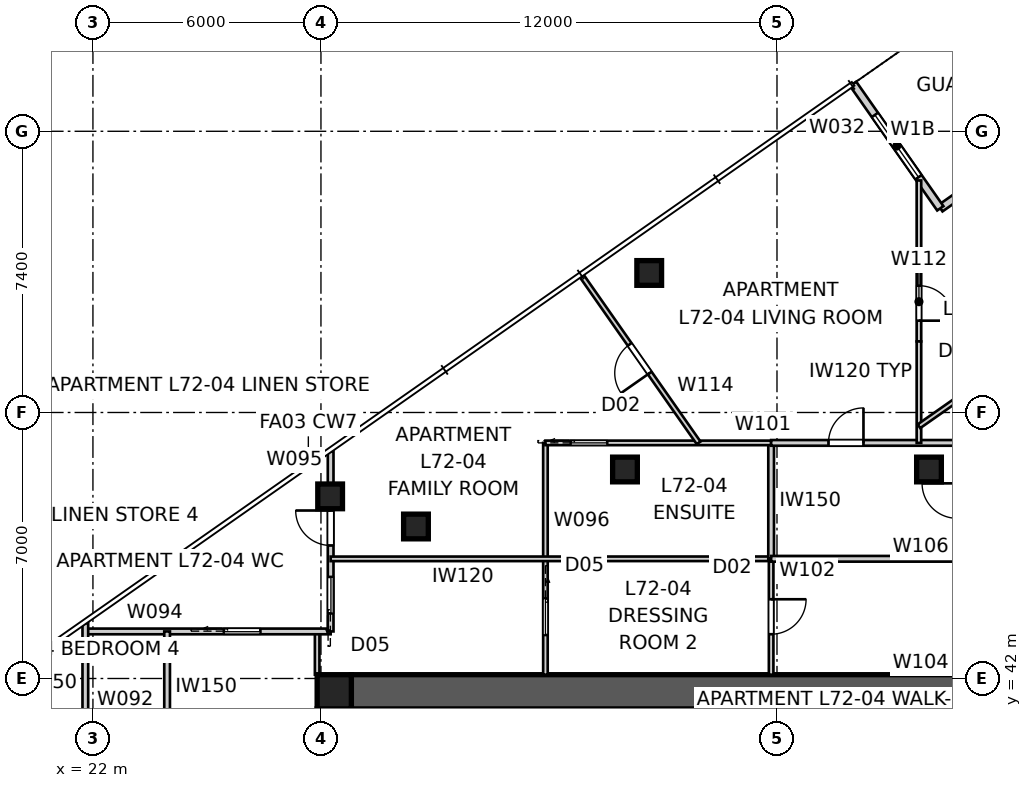
"""IFC4 building model, lengths in metres.
Left out: names, types, materials, properties, quantities, classifications, styles, units other than length and angle.
Written with IfcOpenShell. Run it as: python <this file> out.ifc"""

import sys

from ifc_helpers import new_model, si_unit, direction, frame, frame_2d, origin, origin_2d, place, context, subcontext, project, spatial, polyline, rectangle, outline, extrude, element, fill, save


model = new_model("IFC4")
c1 = context("Model", 3, precision=1e-05, world=origin(), true_north=direction((0.0, 1.0)))
c2 = subcontext(c1, "Body", "Model", "MODEL_VIEW")
j1 = project(units=[si_unit("LENGTHUNIT", "METRE"), si_unit("PLANEANGLEUNIT", "RADIAN")], contexts=[c1])
p1 = place(None, origin())
s1 = spatial("IfcSite", under=j1, at=p1, CompositionType="ELEMENT")
p2 = place(p1, origin())
s2 = spatial("IfcBuilding", under=s1, at=p2, CompositionType="ELEMENT")
p3 = place(p2, frame((0.0, 0.0, 260.8)))
s3 = spatial("IfcBuildingStorey", under=s2, at=p3, CompositionType="ELEMENT", Elevation=260.8)
p4 = place(p3, frame((28.8, 41.65, 0.0), z_axis=(0.0, 0.0, 1.0), x_axis=(1.0, 0.0, 0.0)))
e1 = element("IfcWall", 1, at=p4, inside=s3, PredefinedType="SHEAR", context=c2, shape_type="SweptSolid", body=[
    extrude(outline(polyline([(0.0, -0.45), (22.4, -0.45), (22.4, -0.025), (22.85, -0.025), (22.85, 0.025), (22.4, 0.025), (22.4, 0.45), (0.0, 0.45), (0.0, 0.025), (-0.45, 0.025), (-0.45, -0.025), (0.0, -0.025), (0.0, -0.45)])), origin(), (0.0, 0.0, 1.0), 3.4),
])
p5 = place(p3, frame((28.35, 41.2, 0.0), z_axis=(0.0, 0.0, 1.0), x_axis=(0.0, -1.0, 0.0)))
e2 = element("IfcWall", 2, at=p5, inside=s3, PredefinedType="SHEAR", context=c2, shape_type="SweptSolid", body=[
    extrude(outline(polyline([(0.0, -0.45), (22.4, -0.45), (22.4, -0.025), (22.85, -0.025), (22.85, 0.025), (22.4, 0.025), (22.4, 0.45), (0.0, 0.45), (0.0, 0.025), (-0.45, 0.025), (-0.45, -0.025), (0.0, -0.025), (0.0, -0.45)])), origin(), (0.0, 0.0, 1.0), 3.4),
])
p6 = place(p5, frame((11.14, 0.0, 0.0)))
e3 = element("IfcOpeningElement", 3, at=p6, cuts=e2, PredefinedType="OPENING", context=c2, shape_type="SweptSolid", body=[
    extrude(rectangle(XDim=1.02, YDim=2.4, at=frame_2d((0.51, 1.2))), frame((0.0, 0.46, 0.0), z_axis=(0.0, -1.0, 0.0), x_axis=(1.0, 0.0, 0.0)), (0.0, 0.0, 1.0), 0.92),
])
p7 = place(p3, frame((28.35, 41.65, 0.0), z_axis=(0.0, 0.0, 1.0), x_axis=(1.0, 0.0, 0.0)))
e4 = element("IfcColumn", 4, at=p7, inside=s3, PredefinedType="COLUMN", context=c2, shape_type="SweptSolid", body=[
    extrude(rectangle(XDim=0.9, YDim=0.9, at=origin_2d()), origin(), (0.0, 0.0, 1.0), 3.4),
])
for number, where, z_axis, x_axis in (
    (5, (36.638, 52.672, 0.0), (0.0, 0.0, 1.0), (1.0, 0.0, 0.0)),
    (6, (28.242, 46.793, 0.0), (0.0, 0.0, 1.0), (1.0, 0.0, 0.0)),
    (7, (44.0, 47.5, 0.0), (0.0, 0.0, 1.0), (1.0, 0.0, 0.0)),
    (8, (36.0, 47.5, 0.0), (0.0, 0.0, 1.0), (1.0, 0.0, 0.0)),
    (9, (30.5, 46.0, 0.0), (0.0, 0.0, 1.0), (1.0, 0.0, 0.0)),
):
    element("IfcColumn", number, at=place(p3, frame(where, z_axis=z_axis, x_axis=x_axis)), inside=s3, PredefinedType="COLUMN", context=c2, shape_type="SweptSolid", body=[
        extrude(rectangle(XDim=0.65, YDim=0.65, at=origin_2d()), origin(), (0.0, 0.0, 1.0), 3.4),
    ])
p8 = place(p3, frame((47.574, 56.667, 0.0), z_axis=(0.0, 0.0, 1.0), x_axis=(-0.819165963305, -0.573556557423, 0.0)))
e10 = element("IfcWall", 10, at=p8, inside=s3, PredefinedType="SOLIDWALL", context=c2, shape_type="SweptSolid", body=[
    extrude(rectangle(XDim=4.0, YDim=0.2, at=frame_2d((2.0, 0.0))), origin(), (0.0, 0.0, 1.0), 3.25),
])
p9 = place(p8, frame((0.8, 0.0, 0.0)))
e11 = element("IfcOpeningElement", 11, at=p9, cuts=e10, PredefinedType="OPENING", context=c2, shape_type="SweptSolid", body=[
    extrude(rectangle(XDim=2.4, YDim=2.1, at=frame_2d((1.2, 1.05))), frame((0.0, 0.11, 0.0), z_axis=(0.0, -1.0, 0.0), x_axis=(1.0, 0.0, 0.0)), (0.0, 0.0, 1.0), 0.22),
])
p10 = place(p3, frame((44.298, 54.373, 0.0), z_axis=(0.0, 0.0, 1.0), x_axis=(-0.573597512525, 0.819137286189, 0.0)))
e12 = element("IfcWall", 12, at=p10, inside=s3, PredefinedType="SOLIDWALL", context=c2, shape_type="SweptSolid", body=[
    extrude(rectangle(XDim=4.0, YDim=0.2, at=frame_2d((2.0, 0.0))), origin(), (0.0, 0.0, 1.0), 3.25),
])
p11 = place(p10, frame((1.0, 0.0, 0.45)))
e13 = element("IfcOpeningElement", 13, at=p11, cuts=e12, PredefinedType="OPENING", context=c2, shape_type="SweptSolid", body=[
    extrude(rectangle(XDim=2.0, YDim=1.8, at=frame_2d((1.0, 0.9))), frame((0.0, 0.11, 0.0), z_axis=(0.0, -1.0, 0.0), x_axis=(1.0, 0.0, 0.0)), (0.0, 0.0, 1.0), 0.22),
])
p12 = place(p3, frame((27.9, 42.1, 0.0), z_axis=(0.0, 0.0, 1.0), x_axis=(0.0, 1.0, 0.0)))
e14 = element("IfcWall", 14, at=p12, inside=s3, PredefinedType="PARTITIONING", context=c2, shape_type="SweptSolid", body=[
    extrude(rectangle(XDim=1.138, YDim=0.12, at=frame_2d((0.569, 0.0))), origin(), (0.0, 0.0, 1.0), 3.25),
])
p13 = place(p3, frame((21.8, 43.238, 0.0), z_axis=(0.0, 0.0, 1.0), x_axis=(1.0, 0.0, 0.0)))
e15 = element("IfcWall", 15, at=p13, inside=s3, PredefinedType="SOLIDWALL", context=c2, shape_type="SweptSolid", body=[
    extrude(rectangle(XDim=6.455, YDim=0.15, at=frame_2d((3.228, 0.0))), origin(), (0.0, 0.0, 1.0), 3.25),
])
p14 = place(p13, frame((3.646, 0.0, 0.0)))
e16 = element("IfcOpeningElement", 16, at=p14, cuts=e15, PredefinedType="OPENING", context=c2, shape_type="SweptSolid", body=[
    extrude(rectangle(XDim=0.96, YDim=2.1, at=frame_2d((0.48, 1.05))), frame((0.0, 0.085, 0.0), z_axis=(0.0, -1.0, 0.0), x_axis=(1.0, 0.0, 0.0)), (0.0, 0.0, 1.0), 0.17),
])
p15 = place(p3, frame((28.255, 43.238, 0.0), z_axis=(0.0, 0.0, 1.0), x_axis=(0.0, 1.0, 0.0)))
e17 = element("IfcWall", 17, at=p15, inside=s3, PredefinedType="SOLIDWALL", context=c2, shape_type="SweptSolid", body=[
    extrude(rectangle(XDim=4.736, YDim=0.15, at=frame_2d((2.368, 0.0))), origin(), (0.0, 0.0, 1.0), 3.25),
])
p16 = place(p15, frame((2.262, 0.0, 0.0)))
e18 = element("IfcOpeningElement", 18, at=p16, cuts=e17, PredefinedType="OPENING", context=c2, shape_type="SweptSolid", body=[
    extrude(rectangle(XDim=0.92, YDim=2.34, at=frame_2d((0.46, 1.17))), frame((0.0, 0.085, 0.0), z_axis=(0.0, -1.0, 0.0), x_axis=(1.0, 0.0, 0.0)), (0.0, 0.0, 1.0), 0.17),
])
p17 = place(p15, frame((0.475, 0.0, 0.0)))
e19 = element("IfcOpeningElement", 19, at=p17, cuts=e17, PredefinedType="OPENING", context=c2, shape_type="SweptSolid", body=[
    extrude(rectangle(XDim=0.96, YDim=2.1, at=frame_2d((0.48, 1.05))), frame((0.0, 0.085, 0.0), z_axis=(0.0, -1.0, 0.0), x_axis=(1.0, 0.0, 0.0)), (0.0, 0.0, 1.0), 0.17),
])
p18 = place(p3, frame((33.907, 48.2, 0.0), z_axis=(0.0, 0.0, 1.0), x_axis=(0.0, -1.0, 0.0)))
e20 = element("IfcWall", 20, at=p18, inside=s3, PredefinedType="PARTITIONING", context=c2, shape_type="SweptSolid", body=[
    extrude(rectangle(XDim=6.1, YDim=0.12, at=frame_2d((3.05, 0.0))), origin(), (0.0, 0.0, 1.0), 3.25),
])
p19 = place(p18, frame((4.096, 0.0, 0.0)))
e21 = element("IfcOpeningElement", 21, at=p19, cuts=e20, PredefinedType="OPENING", context=c2, shape_type="SweptSolid", body=[
    extrude(rectangle(XDim=0.96, YDim=2.1, at=frame_2d((0.48, 1.05))), frame((0.0, 0.07, 0.0), z_axis=(0.0, -1.0, 0.0), x_axis=(1.0, 0.0, 0.0)), (0.0, 0.0, 1.0), 0.14),
])
p20 = place(p3, frame((28.255, 45.148, 0.0), z_axis=(0.0, 0.0, 1.0), x_axis=(0.99999998913, 0.000147442917, 0.0)))
e22 = element("IfcWall", 22, at=p20, inside=s3, PredefinedType="PARTITIONING", context=c2, shape_type="SweptSolid", body=[
    extrude(rectangle(XDim=11.591, YDim=0.12, at=frame_2d((5.795, 0.0))), origin(), (0.0, 0.0, 1.0), 3.25),
])
p21 = place(p3, frame((23.952, 40.328, 0.0), z_axis=(0.0, 0.0, 1.0), x_axis=(0.0, 1.0, 0.0)))
e23 = element("IfcWall", 23, at=p21, inside=s3, PredefinedType="SOLIDWALL", context=c2, shape_type="SweptSolid", body=[
    extrude(rectangle(XDim=2.91, YDim=0.15, at=frame_2d((1.455, 0.0))), origin(), (0.0, 0.0, 1.0), 3.25),
])
p22 = place(p3, frame((21.8, 40.328, 0.0), z_axis=(0.0, 0.0, 1.0), x_axis=(0.0, 1.0, 0.0)))
e24 = element("IfcWall", 24, at=p22, inside=s3, PredefinedType="SOLIDWALL", context=c2, shape_type="SweptSolid", body=[
    extrude(rectangle(XDim=3.126, YDim=0.15, at=frame_2d((1.563, 0.0))), origin(), (0.0, 0.0, 1.0), 3.25),
])
p23 = place(p3, frame((39.846, 48.2, 0.0), z_axis=(0.0, 0.0, 1.0), x_axis=(0.0, -1.0, 0.0)))
e25 = element("IfcWall", 25, at=p23, inside=s3, PredefinedType="SOLIDWALL", context=c2, shape_type="SweptSolid", body=[
    extrude(rectangle(XDim=3.05, YDim=0.15, at=frame_2d((1.525, 0.0))), origin(), (0.0, 0.0, 1.0), 3.25),
])
p24 = place(p3, frame((33.907, 48.2, 0.0), z_axis=(0.0, 0.0, 1.0), x_axis=(1.0, 0.0, 0.0)))
e26 = element("IfcWall", 26, at=p24, inside=s3, PredefinedType="PARTITIONING", context=c2, shape_type="SweptSolid", body=[
    extrude(rectangle(XDim=5.939, YDim=0.12, at=frame_2d((2.969, 0.0))), origin(), (0.0, 0.0, 1.0), 3.25),
])
p25 = place(p24, frame((0.666, 0.0, 0.0)))
e27 = element("IfcOpeningElement", 27, at=p25, cuts=e26, PredefinedType="OPENING", context=c2, shape_type="SweptSolid", body=[
    extrude(rectangle(XDim=0.96, YDim=2.1, at=frame_2d((0.48, 1.05))), frame((0.0, 0.07, 0.0), z_axis=(0.0, -1.0, 0.0), x_axis=(1.0, 0.0, 0.0)), (0.0, 0.0, 1.0), 0.14),
])
p26 = place(p3, frame((39.846, 45.15, 0.0), z_axis=(0.0, 0.0, 1.0), x_axis=(0.0, -1.0, 0.0)))
e28 = element("IfcWall", 28, at=p26, inside=s3, PredefinedType="PARTITIONING", context=c2, shape_type="SweptSolid", body=[
    extrude(rectangle(XDim=3.05, YDim=0.12, at=frame_2d((1.525, 0.0))), origin(), (0.0, 0.0, 1.0), 3.25),
])
p27 = place(p26, frame((1.065, 0.0, 0.0)))
e29 = element("IfcOpeningElement", 29, at=p27, cuts=e28, PredefinedType="OPENING", context=c2, shape_type="SweptSolid", body=[
    extrude(rectangle(XDim=0.92, YDim=2.34, at=frame_2d((0.46, 1.17))), frame((0.0, 0.07, 0.0), z_axis=(0.0, -1.0, 0.0), x_axis=(1.0, 0.0, 0.0)), (0.0, 0.0, 1.0), 0.14),
])
p28 = place(p3, frame((39.846, 45.15, 0.0), z_axis=(0.0, 0.0, 1.0), x_axis=(1.0, 0.0, 0.0)))
e30 = element("IfcWall", 30, at=p28, inside=s3, PredefinedType="SOLIDWALL", context=c2, shape_type="SweptSolid", body=[
    extrude(rectangle(XDim=9.784, YDim=0.15, at=frame_2d((4.892, 0.0))), origin(), (0.0, 0.0, 1.0), 3.25),
])
p29 = place(p3, frame((39.846, 48.2, 0.0), z_axis=(0.0, 0.0, 1.0), x_axis=(1.0, 0.0, 0.0)))
e31 = element("IfcWall", 31, at=p29, inside=s3, PredefinedType="SOLIDWALL", context=c2, shape_type="SweptSolid", body=[
    extrude(rectangle(XDim=9.784, YDim=0.15, at=frame_2d((4.892, 0.0))), origin(), (0.0, 0.0, 1.0), 3.25),
])
p30 = place(p29, frame((1.51, 0.0, 0.0)))
e32 = element("IfcOpeningElement", 32, at=p30, cuts=e31, PredefinedType="OPENING", context=c2, shape_type="SweptSolid", body=[
    extrude(rectangle(XDim=0.92, YDim=2.34, at=frame_2d((0.46, 1.17))), frame((0.0, 0.085, 0.0), z_axis=(0.0, -1.0, 0.0), x_axis=(1.0, 0.0, 0.0)), (0.0, 0.0, 1.0), 0.17),
])
p31 = place(p29, frame((6.878, 0.0, 0.0)))
e33 = element("IfcOpeningElement", 33, at=p31, cuts=e31, PredefinedType="OPENING", context=c2, shape_type="SweptSolid", body=[
    extrude(rectangle(XDim=0.92, YDim=2.34, at=frame_2d((0.46, 1.17))), frame((0.0, 0.085, 0.0), z_axis=(0.0, -1.0, 0.0), x_axis=(1.0, 0.0, 0.0)), (0.0, 0.0, 1.0), 0.17),
])
p32 = place(p3, frame((43.735, 55.106, 0.0), z_axis=(0.0, 0.0, 1.0), x_axis=(0.0, -1.0, 0.0)))
e34 = element("IfcWall", 34, at=p32, inside=s3, PredefinedType="PARTITIONING", context=c2, shape_type="SweptSolid", body=[
    extrude(rectangle(XDim=2.144, YDim=0.12, at=frame_2d((1.072, 0.0))), origin(), (0.0, 0.0, 1.0), 3.25),
])
p33 = place(p3, frame((43.735, 52.962, 0.0), z_axis=(0.0, 0.0, 1.0), x_axis=(0.0, -1.0, 0.0)))
e35 = element("IfcWall", 35, at=p33, inside=s3, PredefinedType="PARTITIONING", context=c2, shape_type="SweptSolid", body=[
    extrude(rectangle(XDim=2.092, YDim=0.12, at=frame_2d((1.046, 0.0))), origin(), (0.0, 0.0, 1.0), 2.35),
])
p34 = place(p33, frame((0.625, 0.0, 0.0)))
e36 = element("IfcOpeningElement", 36, at=p34, cuts=e35, PredefinedType="OPENING", context=c2, shape_type="SweptSolid", body=[
    extrude(rectangle(XDim=0.92, YDim=2.34, at=frame_2d((0.46, 1.17))), frame((0.0, 0.07, 0.0), z_axis=(0.0, -1.0, 0.0), x_axis=(1.0, 0.0, 0.0)), (0.0, 0.0, 1.0), 0.14),
])
p35 = place(p3, frame((43.735, 50.87, 0.0), z_axis=(0.0, 0.0, 1.0), x_axis=(0.0, -1.0, 0.0)))
e37 = element("IfcWall", 37, at=p35, inside=s3, PredefinedType="PARTITIONING", context=c2, shape_type="SweptSolid", body=[
    extrude(rectangle(XDim=2.67, YDim=0.12, at=frame_2d((1.335, 0.0))), origin(), (0.0, 0.0, 1.0), 3.25),
])
p36 = place(p3, frame((37.938, 48.2, 0.0), z_axis=(0.0, 0.0, 1.0), x_axis=(-0.573560001964, 0.819163551525, 0.0)))
e38 = element("IfcWall", 38, at=p36, inside=s3, PredefinedType="PARTITIONING", context=c2, shape_type="SweptSolid", body=[
    extrude(rectangle(XDim=5.369, YDim=0.12, at=frame_2d((2.685, 0.0))), origin(), (0.0, 0.0, 1.0), 3.25),
])
p37 = place(p36, frame((2.244, 0.0, 0.0)))
e39 = element("IfcOpeningElement", 39, at=p37, cuts=e38, PredefinedType="OPENING", context=c2, shape_type="SweptSolid", body=[
    extrude(rectangle(XDim=0.92, YDim=2.34, at=frame_2d((0.46, 1.17))), frame((0.0, 0.07, 0.0), z_axis=(0.0, -1.0, 0.0), x_axis=(1.0, 0.0, 0.0)), (0.0, 0.0, 1.0), 0.14),
])
p38 = place(p3, frame((50.051, 53.06, 0.0), z_axis=(0.0, 0.0, 1.0), x_axis=(-0.819161994693, -0.573562225439, 0.0)))
e40 = element("IfcWall", 40, at=p38, inside=s3, PredefinedType="PARTITIONING", context=c2, shape_type="SweptSolid", body=[
    extrude(rectangle(XDim=7.71, YDim=0.12, at=frame_2d((3.855, 0.0))), origin(), (0.0, 0.0, 1.0), 3.25),
])
p39 = place(p11, origin())
e41 = element("IfcWindow", 41, at=p39, inside=s3, PartitioningType="SINGLE_PANEL", PredefinedType="WINDOW", context=c2, shape_type="SweptSolid", body=[
    extrude(rectangle(XDim=2.0, YDim=1.8, at=frame_2d((1.0, 0.9))), frame((0.0, 0.03, 0.0), z_axis=(0.0, -1.0, 0.0), x_axis=(1.0, 0.0, 0.0)), (0.0, 0.0, 1.0), 0.06),
])
fill(e13, e41)
p40 = place(p14, origin())
e42 = element("IfcDoor", 42, at=p40, inside=s3, OperationType="SLIDING_TO_LEFT", PredefinedType="DOOR", context=c2, shape_type="SweptSolid", body=[
    extrude(rectangle(XDim=0.96, YDim=2.1, at=frame_2d((0.48, 1.05))), frame((0.0, 0.025, 0.0), z_axis=(0.0, -1.0, 0.0), x_axis=(1.0, 0.0, 0.0)), (0.0, 0.0, 1.0), 0.05),
])
fill(e16, e42)
p41 = place(p16, origin())
e43 = element("IfcDoor", 43, at=p41, inside=s3, OperationType="SINGLE_SWING_RIGHT", PredefinedType="DOOR", context=c2, shape_type="SweptSolid", body=[
    extrude(rectangle(XDim=0.92, YDim=2.34, at=frame_2d((0.46, 1.17))), frame((0.0, 0.025, 0.0), z_axis=(0.0, -1.0, 0.0), x_axis=(1.0, 0.0, 0.0)), (0.0, 0.0, 1.0), 0.05),
])
fill(e18, e43)
p42 = place(p17, origin())
e44 = element("IfcDoor", 44, at=p42, inside=s3, OperationType="SLIDING_TO_LEFT", PredefinedType="DOOR", context=c2, shape_type="SweptSolid", body=[
    extrude(rectangle(XDim=0.96, YDim=2.1, at=frame_2d((0.48, 1.05))), frame((0.0, 0.025, 0.0), z_axis=(0.0, -1.0, 0.0), x_axis=(1.0, 0.0, 0.0)), (0.0, 0.0, 1.0), 0.05),
])
fill(e19, e44)
p43 = place(p37, origin())
e45 = element("IfcDoor", 45, at=p43, inside=s3, OperationType="SINGLE_SWING_LEFT", PredefinedType="DOOR", context=c2, shape_type="SweptSolid", body=[
    extrude(rectangle(XDim=0.92, YDim=2.34, at=frame_2d((0.46, 1.17))), frame((0.0, 0.025, 0.0), z_axis=(0.0, -1.0, 0.0), x_axis=(1.0, 0.0, 0.0)), (0.0, 0.0, 1.0), 0.05),
])
fill(e39, e45)
p44 = place(p25, origin())
e46 = element("IfcDoor", 46, at=p44, inside=s3, OperationType="SLIDING_TO_LEFT", PredefinedType="DOOR", context=c2, shape_type="SweptSolid", body=[
    extrude(rectangle(XDim=0.96, YDim=2.1, at=frame_2d((0.48, 1.05))), frame((0.0, 0.025, 0.0), z_axis=(0.0, -1.0, 0.0), x_axis=(1.0, 0.0, 0.0)), (0.0, 0.0, 1.0), 0.05),
])
fill(e27, e46)
p45 = place(p19, origin())
e47 = element("IfcDoor", 47, at=p45, inside=s3, OperationType="SLIDING_TO_LEFT", PredefinedType="DOOR", context=c2, shape_type="SweptSolid", body=[
    extrude(rectangle(XDim=0.96, YDim=2.1, at=frame_2d((0.48, 1.05))), frame((0.0, 0.025, 0.0), z_axis=(0.0, -1.0, 0.0), x_axis=(1.0, 0.0, 0.0)), (0.0, 0.0, 1.0), 0.05),
])
fill(e21, e47)
p46 = place(p34, origin())
e48 = element("IfcDoor", 48, at=p46, inside=s3, OperationType="SINGLE_SWING_RIGHT", PredefinedType="DOOR", context=c2, shape_type="SweptSolid", body=[
    extrude(rectangle(XDim=0.92, YDim=2.34, at=frame_2d((0.46, 1.17))), frame((0.0, 0.025, 0.0), z_axis=(0.0, -1.0, 0.0), x_axis=(1.0, 0.0, 0.0)), (0.0, 0.0, 1.0), 0.05),
])
fill(e36, e48)
p47 = place(p30, origin())
e49 = element("IfcDoor", 49, at=p47, inside=s3, OperationType="SINGLE_SWING_RIGHT", PredefinedType="DOOR", context=c2, shape_type="SweptSolid", body=[
    extrude(rectangle(XDim=0.92, YDim=2.34, at=frame_2d((0.46, 1.17))), frame((0.0, 0.025, 0.0), z_axis=(0.0, -1.0, 0.0), x_axis=(1.0, 0.0, 0.0)), (0.0, 0.0, 1.0), 0.05),
])
fill(e32, e49)
p48 = place(p27, origin())
e50 = element("IfcDoor", 50, at=p48, inside=s3, OperationType="SINGLE_SWING_LEFT", PredefinedType="DOOR", context=c2, shape_type="SweptSolid", body=[
    extrude(rectangle(XDim=0.92, YDim=2.34, at=frame_2d((0.46, 1.17))), frame((0.0, 0.025, 0.0), z_axis=(0.0, -1.0, 0.0), x_axis=(1.0, 0.0, 0.0)), (0.0, 0.0, 1.0), 0.05),
])
fill(e29, e50)
save(model, sys.argv[1])
